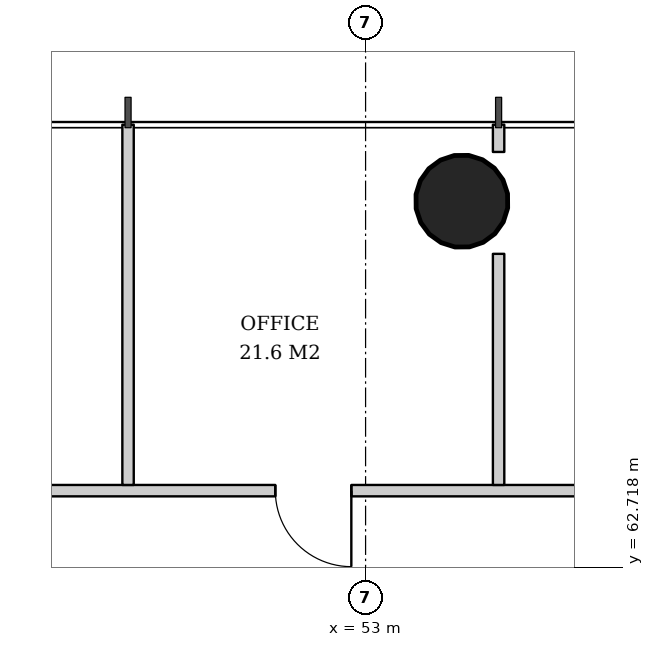
"""IFC4 building model, lengths in metres.
Left out: names, types, materials, properties, quantities, classifications, styles, units other than length and angle.
Written with IfcOpenShell. Run it as: python <this file> out.ifc"""

import sys

from ifc_helpers import new_model, si_unit, direction, frame, frame_2d, origin, origin_2d, place, context, subcontext, project, spatial, rectangle, hollow_circle, extrude, element, fill, save


model = new_model("IFC4")
c1 = context("Model", 3, precision=1e-05, world=origin(), true_north=direction((0.0, 1.0)))
c2 = subcontext(c1, "Body", "Model", "MODEL_VIEW")
j1 = project(units=[si_unit("LENGTHUNIT", "METRE"), si_unit("PLANEANGLEUNIT", "RADIAN")], contexts=[c1])
p1 = place(None, origin())
s1 = spatial("IfcSite", under=j1, at=p1, CompositionType="ELEMENT")
p2 = place(p1, origin())
s2 = spatial("IfcBuilding", under=s1, at=p2, CompositionType="ELEMENT")
p3 = place(p2, frame((0.0, 0.0, 97.0)))
s3 = spatial("IfcBuildingStorey", under=s2, at=p3, CompositionType="ELEMENT", Elevation=97.0)
p4 = place(p3, frame((54.286, 67.572, 0.0), z_axis=(-0.015923015547, -0.031974442509, 0.999361842679), x_axis=(0.895145027055, -0.445775033553, 0.0)))
e1 = element("IfcColumn", 1, at=p4, inside=s3, PredefinedType="COLUMN", context=c2, shape_type="SweptSolid", body=[
    extrude(hollow_circle(Radius=0.61, WallThickness=0.04, at=origin_2d()), origin(), (0.0, 0.0, 1.0), 3.802),
])
p5 = place(p3, frame((60.812, 63.725, 0.0), z_axis=(0.0, 0.0, 1.0), x_axis=(-1.0, 0.0, 0.0)))
e2 = element("IfcWall", 2, at=p5, inside=s3, PredefinedType="PARTITIONING", context=c2, shape_type="SweptSolid", body=[
    extrude(rectangle(XDim=31.623, YDim=0.15, at=frame_2d((15.812, 0.0))), origin(), (0.0, 0.0, 1.0), 2.72),
])
p6 = place(p5, frame((3.124, 0.0, 0.0)))
e3 = element("IfcOpeningElement", 3, at=p6, cuts=e2, PredefinedType="OPENING", context=c2, shape_type="SweptSolid", body=[
    extrude(rectangle(XDim=1.0, YDim=2.1, at=frame_2d((0.5, 1.05))), frame((0.0, 0.085, 0.0), z_axis=(0.0, -1.0, 0.0), x_axis=(1.0, 0.0, 0.0)), (0.0, 0.0, 1.0), 0.17),
])
p7 = place(p5, frame((7.999, 0.0, 0.0)))
e4 = element("IfcOpeningElement", 4, at=p7, cuts=e2, PredefinedType="OPENING", context=c2, shape_type="SweptSolid", body=[
    extrude(rectangle(XDim=1.0, YDim=2.1, at=frame_2d((0.5, 1.05))), frame((0.0, 0.085, 0.0), z_axis=(0.0, -1.0, 0.0), x_axis=(1.0, 0.0, 0.0)), (0.0, 0.0, 1.0), 0.17),
])
p8 = place(p5, frame((12.874, 0.0, 0.0)))
e5 = element("IfcOpeningElement", 5, at=p8, cuts=e2, PredefinedType="OPENING", context=c2, shape_type="SweptSolid", body=[
    extrude(rectangle(XDim=1.0, YDim=2.1, at=frame_2d((0.5, 1.05))), frame((0.0, 0.085, 0.0), z_axis=(0.0, -1.0, 0.0), x_axis=(1.0, 0.0, 0.0)), (0.0, 0.0, 1.0), 0.17),
])
p9 = place(p5, frame((17.749, 0.0, 0.0)))
e6 = element("IfcOpeningElement", 6, at=p9, cuts=e2, PredefinedType="OPENING", context=c2, shape_type="SweptSolid", body=[
    extrude(rectangle(XDim=1.0, YDim=2.1, at=frame_2d((0.5, 1.05))), frame((0.0, 0.085, 0.0), z_axis=(0.0, -1.0, 0.0), x_axis=(1.0, 0.0, 0.0)), (0.0, 0.0, 1.0), 0.17),
])
p10 = place(p5, frame((22.624, 0.0, 0.0)))
e7 = element("IfcOpeningElement", 7, at=p10, cuts=e2, PredefinedType="OPENING", context=c2, shape_type="SweptSolid", body=[
    extrude(rectangle(XDim=1.0, YDim=2.1, at=frame_2d((0.5, 1.05))), frame((0.0, 0.085, 0.0), z_axis=(0.0, -1.0, 0.0), x_axis=(1.0, 0.0, 0.0)), (0.0, 0.0, 1.0), 0.17),
])
p11 = place(p5, frame((27.499, 0.0, 0.0)))
e8 = element("IfcOpeningElement", 8, at=p11, cuts=e2, PredefinedType="OPENING", context=c2, shape_type="SweptSolid", body=[
    extrude(rectangle(XDim=1.0, YDim=2.1, at=frame_2d((0.5, 1.05))), frame((0.0, 0.085, 0.0), z_axis=(0.0, -1.0, 0.0), x_axis=(1.0, 0.0, 0.0)), (0.0, 0.0, 1.0), 0.17),
])
p12 = place(p3, frame((54.75, 63.8, 0.0), z_axis=(0.0, 0.0, 1.0), x_axis=(0.0, 1.0, 0.0)))
e9 = element("IfcWall", 9, at=p12, inside=s3, PredefinedType="PARTITIONING", context=c2, shape_type="SweptSolid", body=[
    extrude(rectangle(XDim=3.041, YDim=0.15, at=frame_2d((1.52, 0.0))), origin(), (0.0, 0.0, 1.0), 3.62),
])
p13 = place(p3, frame((54.75, 68.181, 0.0), z_axis=(0.0, 0.0, 1.0), x_axis=(0.0, 1.0, 0.0)))
e10 = element("IfcWall", 10, at=p13, inside=s3, PredefinedType="PARTITIONING", context=c2, shape_type="SweptSolid", body=[
    extrude(rectangle(XDim=0.359, YDim=0.15, at=frame_2d((0.18, 0.0))), origin(), (0.0, 0.0, 1.0), 3.62),
])
p14 = place(p3, frame((49.875, 63.8, 0.0), z_axis=(0.0, 0.0, 1.0), x_axis=(0.0, 1.0, 0.0)))
e11 = element("IfcWall", 11, at=p14, inside=s3, PredefinedType="PARTITIONING", context=c2, shape_type="SweptSolid", body=[
    extrude(rectangle(XDim=4.74, YDim=0.15, at=frame_2d((2.37, 0.0))), origin(), (0.0, 0.0, 1.0), 2.82),
])
p15 = place(p7, origin())
e12 = element("IfcDoor", 12, at=p15, inside=s3, OperationType="SINGLE_SWING_LEFT", PredefinedType="DOOR", context=c2, shape_type="SweptSolid", body=[
    extrude(rectangle(XDim=1.0, YDim=2.1, at=frame_2d((0.5, 1.05))), frame((0.0, 0.025, 0.0), z_axis=(0.0, -1.0, 0.0), x_axis=(1.0, 0.0, 0.0)), (0.0, 0.0, 1.0), 0.05),
])
fill(e4, e12)
save(model, sys.argv[1])
